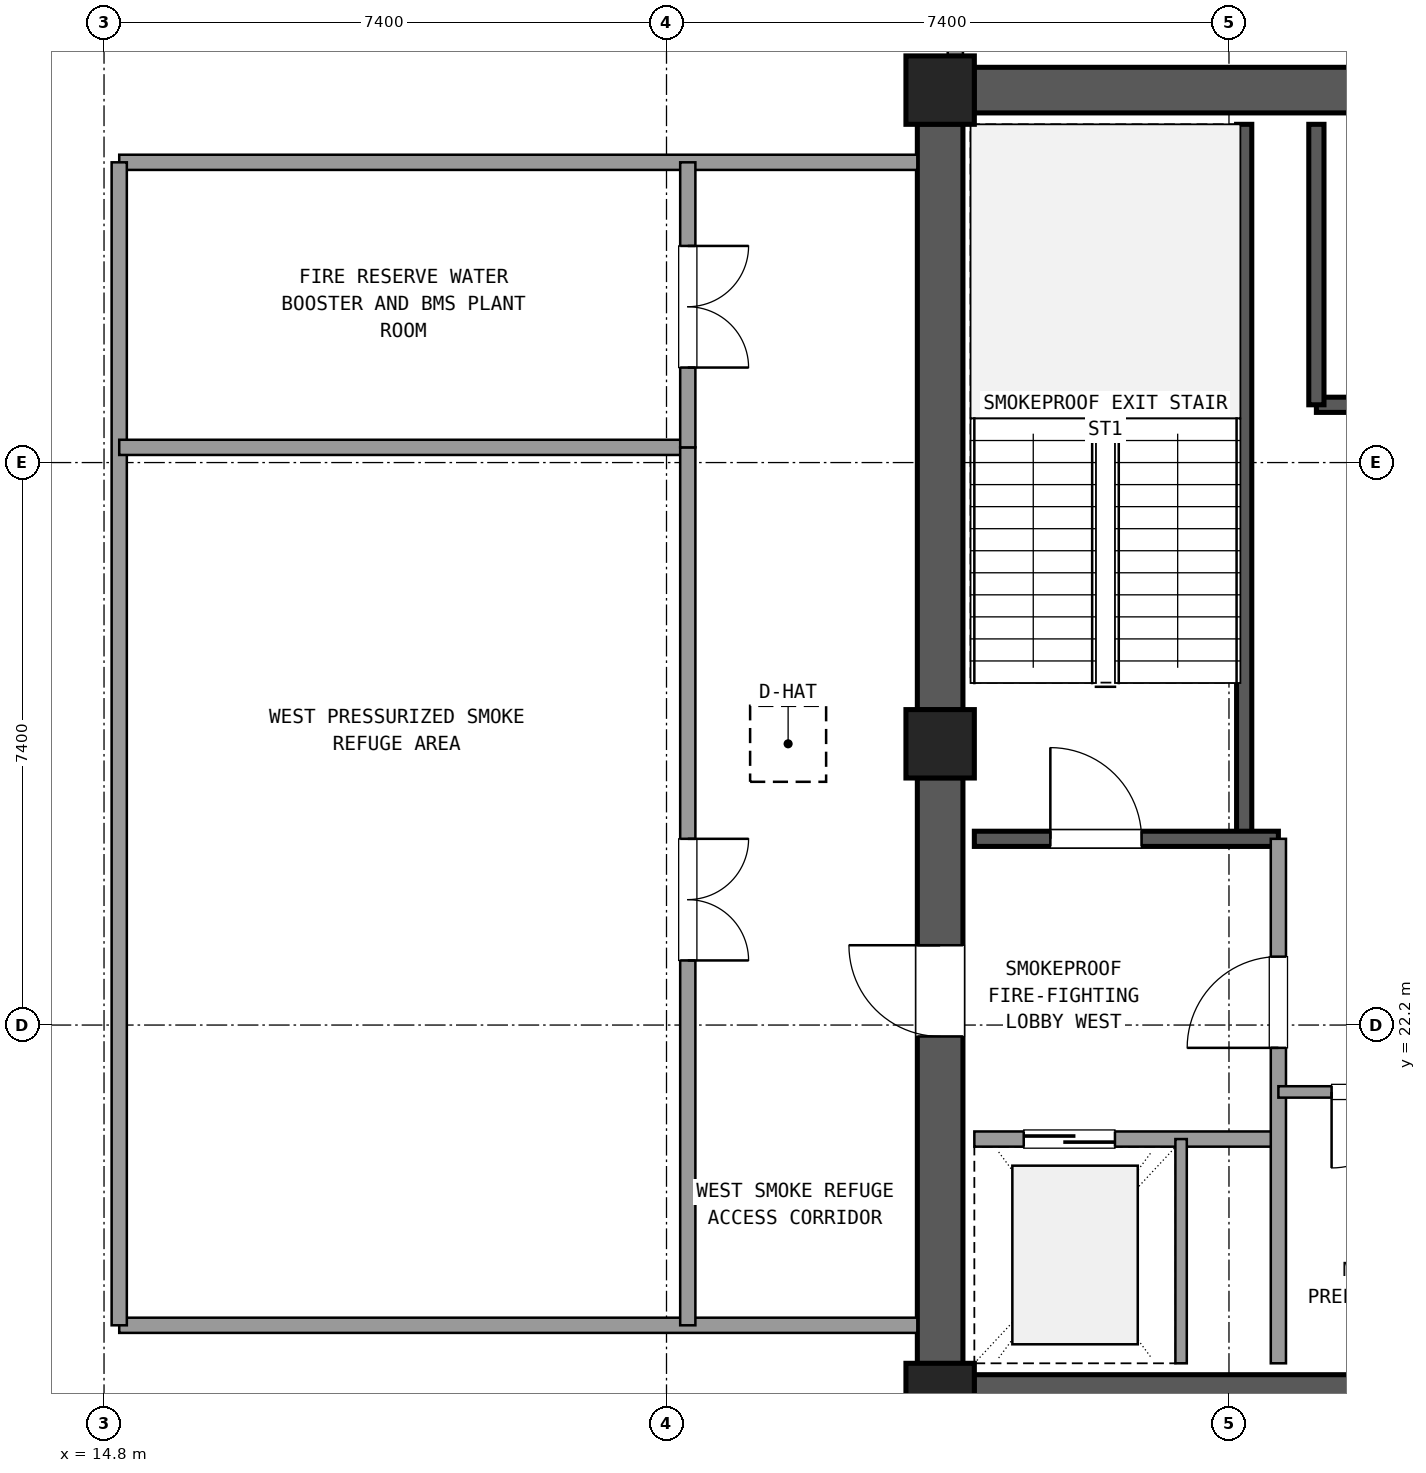
"""IFC4 building model, lengths in metres.
Left out: names, types, materials, properties, quantities, classifications, styles, units other than length and angle.
Written with IfcOpenShell. Run it as: python <this file> out.ifc"""

import sys

from ifc_helpers import new_model, si_unit, direction, frame, frame_2d, origin, origin_2d, place, context, subcontext, project, spatial, rectangle, extrude, element, fill, save


model = new_model("IFC4")
c1 = context("Model", 3, precision=1e-05, world=origin(), true_north=direction((0.0, 1.0)))
c2 = subcontext(c1, "Body", "Model", "MODEL_VIEW")
j1 = project(units=[si_unit("LENGTHUNIT", "METRE"), si_unit("PLANEANGLEUNIT", "RADIAN")], contexts=[c1])
p1 = place(None, origin())
s1 = spatial("IfcSite", under=j1, at=p1, CompositionType="ELEMENT")
p2 = place(p1, origin())
s2 = spatial("IfcBuilding", under=s1, at=p2, CompositionType="ELEMENT")
p3 = place(p2, frame((0.0, 0.0, 232.38)))
s3 = spatial("IfcBuildingStorey", under=s2, at=p3, CompositionType="ELEMENT", Elevation=232.38)
for number, where, z_axis, x_axis in (
    (1, (25.8, 17.3, 0.0), (0.0, 0.0, 1.0), (1.0, 0.0, 0.0)),
    (2, (25.8, 34.5, 0.0), (0.0, 0.0, 1.0), (1.0, 0.0, 0.0)),
    (3, (25.8, 25.9, 0.0), (0.0, 0.0, 1.0), (1.0, 0.0, 0.0)),
):
    element("IfcColumn", number, at=place(p3, frame(where, z_axis=z_axis, x_axis=x_axis)), inside=s3, PredefinedType="COLUMN", context=c2, shape_type="SweptSolid", body=[
        extrude(rectangle(XDim=0.9, YDim=0.9, at=origin_2d()), origin(), (0.0, 0.0, 1.0), 4.68),
    ])
p4 = place(p3, frame((26.245, 17.3, 0.0), z_axis=(0.0, 0.0, 1.0), x_axis=(1.0, 0.0, 0.0)))
e4 = element("IfcWall", 4, at=p4, inside=s3, PredefinedType="SHEAR", context=c2, shape_type="SweptSolid", body=[
    extrude(rectangle(XDim=10.31, YDim=0.6, at=frame_2d((5.155, 0.0))), origin(), (0.0, 0.0, 1.0), 4.38),
])
p5 = place(p3, frame((36.555, 34.5, 0.0), z_axis=(0.0, 0.0, 1.0), x_axis=(-1.0, 0.0, 0.0)))
e5 = element("IfcWall", 5, at=p5, inside=s3, PredefinedType="SHEAR", context=c2, shape_type="SweptSolid", body=[
    extrude(rectangle(XDim=10.31, YDim=0.6, at=frame_2d((5.155, 0.0))), origin(), (0.0, 0.0, 1.0), 4.38),
])
p6 = place(p5, frame((4.155, 0.0, 0.0)))
e6 = element("IfcOpeningElement", 6, at=p6, cuts=e5, PredefinedType="OPENING", context=c2, shape_type="SweptSolid", body=[
    extrude(rectangle(XDim=1.2, YDim=2.15, at=frame_2d((0.6, 1.075))), frame((0.0, 0.31, 0.0), z_axis=(0.0, -1.0, 0.0), x_axis=(1.0, 0.0, 0.0)), (0.0, 0.0, 1.0), 0.62),
])
p7 = place(p3, frame((25.8, 34.055, 0.0), z_axis=(0.0, 0.0, 1.0), x_axis=(0.0, -1.0, 0.0)))
e7 = element("IfcWall", 7, at=p7, inside=s3, PredefinedType="SHEAR", context=c2, shape_type="SweptSolid", body=[
    extrude(rectangle(XDim=7.71, YDim=0.6, at=frame_2d((3.855, 0.0))), origin(), (0.0, 0.0, 1.0), 4.38),
])
p8 = place(p3, frame((25.8, 25.455, 0.0), z_axis=(0.0, 0.0, 1.0), x_axis=(0.0, -1.0, 0.0)))
e8 = element("IfcWall", 8, at=p8, inside=s3, PredefinedType="SHEAR", context=c2, shape_type="SweptSolid", body=[
    extrude(rectangle(XDim=7.71, YDim=0.6, at=frame_2d((3.855, 0.0))), origin(), (0.0, 0.0, 1.0), 4.38),
])
p9 = place(p8, frame((2.205, 0.0, 0.0)))
e9 = element("IfcOpeningElement", 9, at=p9, cuts=e8, PredefinedType="OPENING", context=c2, shape_type="SweptSolid", body=[
    extrude(rectangle(XDim=1.2, YDim=2.15, at=frame_2d((0.6, 1.075))), frame((0.0, 0.31, 0.0), z_axis=(0.0, -1.0, 0.0), x_axis=(1.0, 0.0, 0.0)), (0.0, 0.0, 1.0), 0.62),
])
p10 = place(p3, frame((29.8, 24.65, 0.0), z_axis=(0.0, 0.0, 1.0), x_axis=(0.0, 1.0, 0.0)))
e10 = element("IfcWall", 10, at=p10, inside=s3, PredefinedType="SHEAR", context=c2, shape_type="SweptSolid", body=[
    extrude(rectangle(XDim=9.4, YDim=0.2, at=frame_2d((4.7, 0.0))), origin(), (0.0, 0.0, 1.0), 4.38),
])
p11 = place(p3, frame((26.25, 24.65, 0.0), z_axis=(0.0, 0.0, 1.0), x_axis=(1.0, 0.0, 0.0)))
e11 = element("IfcWall", 11, at=p11, inside=s3, PredefinedType="SHEAR", context=c2, shape_type="SweptSolid", body=[
    extrude(rectangle(XDim=4.0, YDim=0.2, at=frame_2d((2.0, 0.0))), origin(), (0.0, 0.0, 1.0), 4.38),
])
p12 = place(p11, frame((1.0, 0.0, 0.0)))
e12 = element("IfcOpeningElement", 12, at=p12, cuts=e11, PredefinedType="OPENING", context=c2, shape_type="SweptSolid", body=[
    extrude(rectangle(XDim=1.2, YDim=2.15, at=frame_2d((0.6, 1.075))), frame((0.0, 0.11, 0.0), z_axis=(0.0, -1.0, 0.0), x_axis=(1.0, 0.0, 0.0)), (0.0, 0.0, 1.0), 0.22),
])
p13 = place(p3, frame((30.75, 30.36, 0.0), z_axis=(0.0, 0.0, 1.0), x_axis=(1.0, 0.0, 0.0)))
e13 = element("IfcWall", 13, at=p13, inside=s3, PredefinedType="SHEAR", context=c2, shape_type="SweptSolid", body=[
    extrude(rectangle(XDim=9.5, YDim=0.2, at=frame_2d((4.75, 0.0))), origin(), (0.0, 0.0, 1.0), 4.38),
])
p14 = place(p3, frame((30.75, 30.36, 0.0), z_axis=(0.0, 0.0, 1.0), x_axis=(0.0, 1.0, 0.0)))
e14 = element("IfcWall", 14, at=p14, inside=s3, PredefinedType="SHEAR", context=c2, shape_type="SweptSolid", body=[
    extrude(rectangle(XDim=3.69, YDim=0.2, at=frame_2d((1.845, 0.0))), origin(), (0.0, 0.0, 1.0), 4.38),
])
p15 = place(p3, frame((26.25, 20.7, 0.0), z_axis=(0.0, 0.0, 1.0), x_axis=(1.0, 0.0, 0.0)))
e15 = element("IfcWall", 15, at=p15, inside=s3, PredefinedType="SOLIDWALL", context=c2, shape_type="SweptSolid", body=[
    extrude(rectangle(XDim=4.0, YDim=0.2, at=frame_2d((2.0, 0.0))), origin(), (0.0, 0.0, 1.0), 2.75),
])
p16 = place(p15, frame((0.65, 0.0, 0.0)))
e16 = element("IfcOpeningElement", 16, at=p16, cuts=e15, PredefinedType="OPENING", context=c2, shape_type="SweptSolid", body=[
    extrude(rectangle(XDim=1.2, YDim=2.15, at=frame_2d((0.6, 1.075))), frame((0.0, 0.11, 0.0), z_axis=(0.0, -1.0, 0.0), x_axis=(1.0, 0.0, 0.0)), (0.0, 0.0, 1.0), 0.22),
])
p17 = place(p3, frame((30.25, 17.75, 0.0), z_axis=(0.0, 0.0, 1.0), x_axis=(0.0, 1.0, 0.0)))
e17 = element("IfcWall", 17, at=p17, inside=s3, PredefinedType="SOLIDWALL", context=c2, shape_type="SweptSolid", body=[
    extrude(rectangle(XDim=6.9, YDim=0.2, at=frame_2d((3.45, 0.0))), origin(), (0.0, 0.0, 1.0), 2.75),
])
p18 = place(p17, frame((4.15, 0.0, 0.0)))
e18 = element("IfcOpeningElement", 18, at=p18, cuts=e17, PredefinedType="OPENING", context=c2, shape_type="SweptSolid", body=[
    extrude(rectangle(XDim=1.2, YDim=2.15, at=frame_2d((0.6, 1.075))), frame((0.0, 0.11, 0.0), z_axis=(0.0, -1.0, 0.0), x_axis=(1.0, 0.0, 0.0)), (0.0, 0.0, 1.0), 0.22),
])
p19 = place(p3, frame((28.97, 17.75, 0.0), z_axis=(0.0, 0.0, 1.0), x_axis=(0.0, 1.0, 0.0)))
e19 = element("IfcWall", 19, at=p19, inside=s3, PredefinedType="PARTITIONING", context=c2, shape_type="SweptSolid", body=[
    extrude(rectangle(XDim=2.95, YDim=0.15, at=frame_2d((1.475, 0.0))), origin(), (0.0, 0.0, 1.0), 2.75),
])
p20 = place(p3, frame((30.25, 21.32, 0.0), z_axis=(0.0, 0.0, 1.0), x_axis=(1.0, 0.0, 0.0)))
e20 = element("IfcWall", 20, at=p20, inside=s3, PredefinedType="PARTITIONING", context=c2, shape_type="SweptSolid", body=[
    extrude(rectangle(XDim=7.0, YDim=0.15, at=frame_2d((3.5, 0.0))), origin(), (0.0, 0.0, 1.0), 2.75),
])
p21 = place(p20, frame((0.7, 0.0, 0.0)))
e21 = element("IfcOpeningElement", 21, at=p21, cuts=e20, PredefinedType="OPENING", context=c2, shape_type="SweptSolid", body=[
    extrude(rectangle(XDim=1.0, YDim=2.15, at=frame_2d((0.5, 1.075))), frame((0.0, 0.085, 0.0), z_axis=(0.0, -1.0, 0.0), x_axis=(1.0, 0.0, 0.0)), (0.0, 0.0, 1.0), 0.17),
])
p22 = place(p20, frame((3.7, 0.0, 0.0)))
e22 = element("IfcOpeningElement", 22, at=p22, cuts=e20, PredefinedType="OPENING", context=c2, shape_type="SweptSolid", body=[
    extrude(rectangle(XDim=1.0, YDim=2.15, at=frame_2d((0.5, 1.075))), frame((0.0, 0.085, 0.0), z_axis=(0.0, -1.0, 0.0), x_axis=(1.0, 0.0, 0.0)), (0.0, 0.0, 1.0), 0.17),
])
p23 = place(p3, frame((26.0, 34.8, 0.0), z_axis=(0.0, 0.0, 1.0), x_axis=(0.0, 1.0, 0.0)))
e23 = element("IfcWall", 23, at=p23, inside=s3, PredefinedType="SOLIDWALL", context=c2, shape_type="SweptSolid", body=[
    extrude(rectangle(XDim=10.4, YDim=0.2, at=frame_2d((5.2, 0.0))), origin(), (0.0, 0.0, 1.0), 2.75),
])
for number, where, z_axis, x_axis in (
    (24, (15.0, 18.25, 0.0), (0.0, 0.0, 1.0), (1.0, 0.0, 0.0)),
    (25, (15.0, 33.55, 0.0), (0.0, 0.0, 1.0), (1.0, 0.0, 0.0)),
):
    element("IfcWall", number, at=place(p3, frame(where, z_axis=z_axis, x_axis=x_axis)), inside=s3, PredefinedType="SOLIDWALL", context=c2, shape_type="SweptSolid", body=[
        extrude(rectangle(XDim=10.5, YDim=0.2, at=frame_2d((5.25, 0.0))), origin(), (0.0, 0.0, 1.0), 2.75),
    ])
p24 = place(p3, frame((15.0, 18.25, 0.0), z_axis=(0.0, 0.0, 1.0), x_axis=(0.0, 1.0, 0.0)))
e26 = element("IfcWall", 26, at=p24, inside=s3, PredefinedType="SOLIDWALL", context=c2, shape_type="SweptSolid", body=[
    extrude(rectangle(XDim=15.3, YDim=0.2, at=frame_2d((7.65, 0.0))), origin(), (0.0, 0.0, 1.0), 2.75),
])
p25 = place(p3, frame((15.0, 29.8, 0.0), z_axis=(0.0, 0.0, 1.0), x_axis=(1.0, 0.0, 0.0)))
e27 = element("IfcWall", 27, at=p25, inside=s3, PredefinedType="SOLIDWALL", context=c2, shape_type="SweptSolid", body=[
    extrude(rectangle(XDim=7.48, YDim=0.2, at=frame_2d((3.74, 0.0))), origin(), (0.0, 0.0, 1.0), 2.75),
])
p26 = place(p3, frame((22.48, 18.25, 0.0), z_axis=(0.0, 0.0, 1.0), x_axis=(0.0, 1.0, 0.0)))
e28 = element("IfcWall", 28, at=p26, inside=s3, PredefinedType="SOLIDWALL", context=c2, shape_type="SweptSolid", body=[
    extrude(rectangle(XDim=11.55, YDim=0.2, at=frame_2d((5.775, 0.0))), origin(), (0.0, 0.0, 1.0), 2.75),
])
p27 = place(p26, frame((4.8, 0.0, 0.0)))
e29 = element("IfcOpeningElement", 29, at=p27, cuts=e28, PredefinedType="OPENING", context=c2, shape_type="SweptSolid", body=[
    extrude(rectangle(XDim=1.6, YDim=2.2, at=frame_2d((0.8, 1.1))), frame((0.0, 0.11, 0.0), z_axis=(0.0, -1.0, 0.0), x_axis=(1.0, 0.0, 0.0)), (0.0, 0.0, 1.0), 0.22),
])
p28 = place(p3, frame((22.48, 29.8, 0.0), z_axis=(0.0, 0.0, 1.0), x_axis=(0.0, 1.0, 0.0)))
e30 = element("IfcWall", 30, at=p28, inside=s3, PredefinedType="SOLIDWALL", context=c2, shape_type="SweptSolid", body=[
    extrude(rectangle(XDim=3.75, YDim=0.2, at=frame_2d((1.875, 0.0))), origin(), (0.0, 0.0, 1.0), 2.75),
])
p29 = place(p28, frame((1.05, 0.0, 0.0)))
e31 = element("IfcOpeningElement", 31, at=p29, cuts=e30, PredefinedType="OPENING", context=c2, shape_type="SweptSolid", body=[
    extrude(rectangle(XDim=1.6, YDim=2.2, at=frame_2d((0.8, 1.1))), frame((0.0, 0.11, 0.0), z_axis=(0.0, -1.0, 0.0), x_axis=(1.0, 0.0, 0.0)), (0.0, 0.0, 1.0), 0.22),
])
p30 = place(p3, frame((0.0, 0.0, -0.3)))
p31 = place(p30, frame((23.8, 25.9, -0.01)))
p32 = place(p31, frame((0.0, 0.0, 0.29)))
e32 = element("IfcDoor", 32, at=p32, inside=s3, OperationType="SINGLE_SWING_LEFT", PredefinedType="TRAPDOOR", context=c2, shape_type="SweptSolid", body=[
    extrude(rectangle(XDim=1.0, YDim=1.0, at=origin_2d()), origin(), (0.0, 0.0, 1.0), 0.02),
])
p33 = place(p12, origin())
e33 = element("IfcDoor", 33, at=p33, inside=s3, OperationType="SINGLE_SWING_LEFT", PredefinedType="DOOR", context=c2, shape_type="SweptSolid", body=[
    extrude(rectangle(XDim=1.2, YDim=2.15, at=frame_2d((0.6, 1.075))), frame((0.0, 0.025, 0.0), z_axis=(0.0, -1.0, 0.0), x_axis=(1.0, 0.0, 0.0)), (0.0, 0.0, 1.0), 0.05),
])
fill(e12, e33)
p34 = place(p16, origin())
e34 = element("IfcDoor", 34, at=p34, inside=s3, OperationType="SLIDING_TO_LEFT", PredefinedType="DOOR", context=c2, shape_type="SweptSolid", body=[
    extrude(rectangle(XDim=1.2, YDim=2.15, at=frame_2d((0.6, 1.075))), frame((0.0, 0.025, 0.0), z_axis=(0.0, -1.0, 0.0), x_axis=(1.0, 0.0, 0.0)), (0.0, 0.0, 1.0), 0.05),
])
fill(e16, e34)
p35 = place(p18, origin())
e35 = element("IfcDoor", 35, at=p35, inside=s3, OperationType="SINGLE_SWING_LEFT", PredefinedType="DOOR", context=c2, shape_type="SweptSolid", body=[
    extrude(rectangle(XDim=1.2, YDim=2.15, at=frame_2d((0.6, 1.075))), frame((0.0, 0.025, 0.0), z_axis=(0.0, -1.0, 0.0), x_axis=(1.0, 0.0, 0.0)), (0.0, 0.0, 1.0), 0.05),
])
fill(e18, e35)
p36 = place(p9, frame((1.2, 0.0, 0.0), z_axis=(0.0, 0.0, 1.0), x_axis=(-1.0, 0.0, 0.0)))
e36 = element("IfcDoor", 36, at=p36, inside=s3, OperationType="SINGLE_SWING_LEFT", PredefinedType="DOOR", context=c2, shape_type="SweptSolid", body=[
    extrude(rectangle(XDim=1.2, YDim=2.15, at=frame_2d((0.6, 1.075))), frame((0.0, 0.025, 0.0), z_axis=(0.0, -1.0, 0.0), x_axis=(1.0, 0.0, 0.0)), (0.0, 0.0, 1.0), 0.05),
])
fill(e9, e36)
p37 = place(p21, frame((1.0, 0.0, 0.0), z_axis=(0.0, 0.0, 1.0), x_axis=(-1.0, 0.0, 0.0)))
e37 = element("IfcDoor", 37, at=p37, inside=s3, OperationType="SINGLE_SWING_LEFT", PredefinedType="DOOR", context=c2, shape_type="SweptSolid", body=[
    extrude(rectangle(XDim=1.0, YDim=2.15, at=frame_2d((0.5, 1.075))), frame((0.0, 0.025, 0.0), z_axis=(0.0, -1.0, 0.0), x_axis=(1.0, 0.0, 0.0)), (0.0, 0.0, 1.0), 0.05),
])
fill(e21, e37)
p38 = place(p27, frame((1.6, 0.0, 0.0), z_axis=(0.0, 0.0, 1.0), x_axis=(-1.0, 0.0, 0.0)))
e38 = element("IfcDoor", 38, at=p38, inside=s3, OperationType="DOUBLE_DOOR_SINGLE_SWING", PredefinedType="DOOR", context=c2, shape_type="SweptSolid", body=[
    extrude(rectangle(XDim=1.6, YDim=2.2, at=frame_2d((0.8, 1.1))), frame((0.0, 0.025, 0.0), z_axis=(0.0, -1.0, 0.0), x_axis=(1.0, 0.0, 0.0)), (0.0, 0.0, 1.0), 0.05),
])
fill(e29, e38)
p39 = place(p29, frame((1.6, 0.0, 0.0), z_axis=(0.0, 0.0, 1.0), x_axis=(-1.0, 0.0, 0.0)))
e39 = element("IfcDoor", 39, at=p39, inside=s3, OperationType="DOUBLE_DOOR_SINGLE_SWING", PredefinedType="DOOR", context=c2, shape_type="SweptSolid", body=[
    extrude(rectangle(XDim=1.6, YDim=2.2, at=frame_2d((0.8, 1.1))), frame((0.0, 0.025, 0.0), z_axis=(0.0, -1.0, 0.0), x_axis=(1.0, 0.0, 0.0)), (0.0, 0.0, 1.0), 0.05),
])
fill(e31, e39)
save(model, sys.argv[1])
